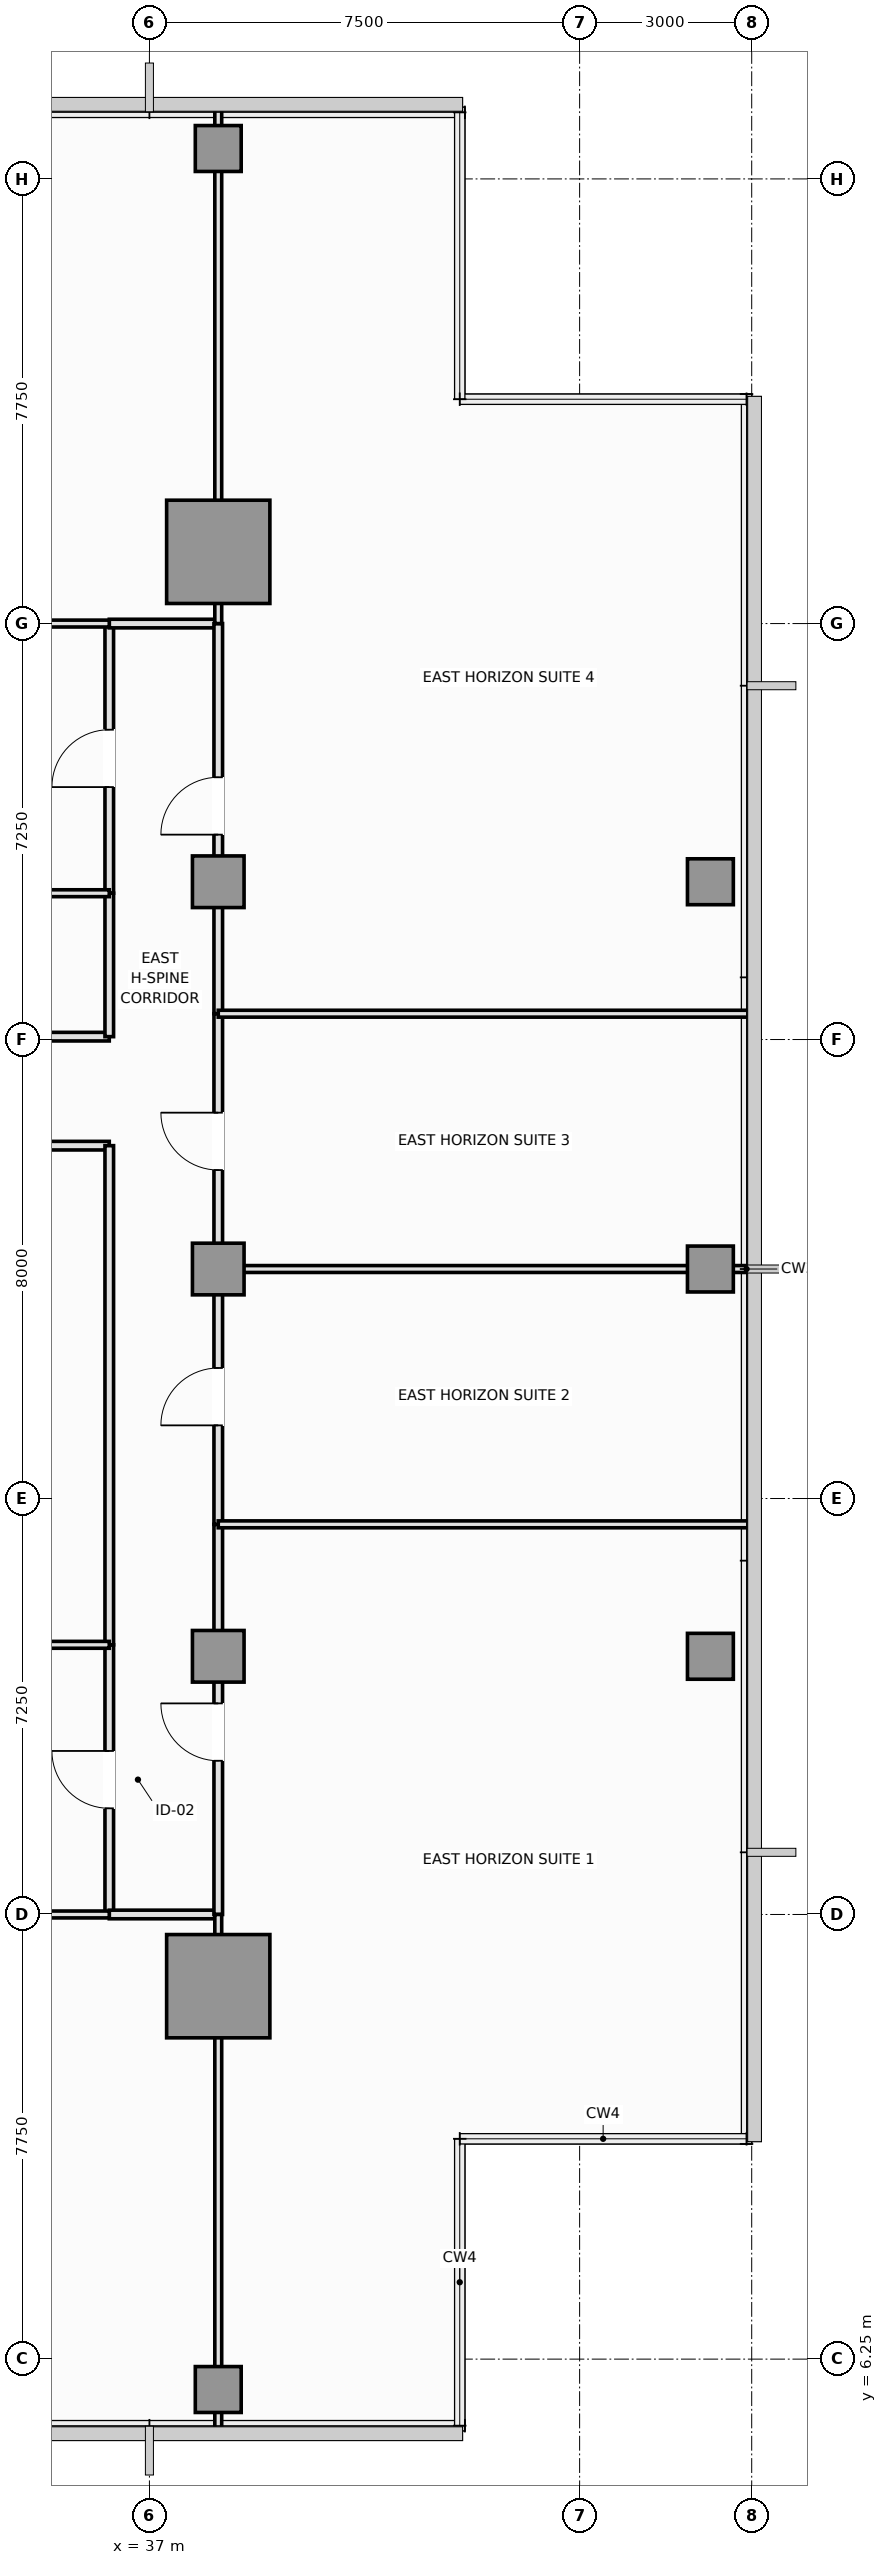
"""IFC4 building model, lengths in metres.
Left out: names, types, materials, properties, quantities, classifications, styles, units other than length and angle.
Written with IfcOpenShell. Run it as: python <this file> out.ifc"""

import sys

from ifc_helpers import new_model, si_unit, direction, frame, frame_2d, origin, origin_2d, place, context, subcontext, project, spatial, rectangle, extrude, element, fill, save


model = new_model("IFC4")
c1 = context("Model", 3, precision=1e-05, world=origin(), true_north=direction((0.0, 1.0)))
c2 = subcontext(c1, "Body", "Model", "MODEL_VIEW")
j1 = project(units=[si_unit("LENGTHUNIT", "METRE"), si_unit("PLANEANGLEUNIT", "RADIAN")], contexts=[c1])
p1 = place(None, origin())
s1 = spatial("IfcSite", under=j1, at=p1, CompositionType="ELEMENT")
p2 = place(p1, origin())
s2 = spatial("IfcBuilding", under=s1, at=p2, CompositionType="ELEMENT")
p3 = place(p2, frame((0.0, 0.0, 209.35)))
s3 = spatial("IfcBuildingStorey", under=s2, at=p3, CompositionType="ELEMENT", Elevation=209.35)
for number, where, z_axis, x_axis in (
    (1, (38.2, 12.75, 0.0), (0.0, 0.0, 1.0), (1.0, 0.0, 0.0)),
    (2, (38.2, 37.75, 0.0), (0.0, 0.0, 1.0), (1.0, 0.0, 0.0)),
):
    element("IfcColumn", number, at=place(p3, frame(where, z_axis=z_axis, x_axis=x_axis)), inside=s3, PredefinedType="COLUMN", context=c2, shape_type="SweptSolid", body=[
        extrude(rectangle(XDim=1.8, YDim=1.8, at=origin_2d()), origin(), (0.0, 0.0, 1.0), 3.55),
    ])
for number, where, z_axis, x_axis in (
    (3, (38.2, 18.5, 0.0), (0.0, 0.0, 1.0), (1.0, 0.0, 0.0)),
    (4, (38.2, 25.25, 0.0), (0.0, 0.0, 1.0), (1.0, 0.0, 0.0)),
    (5, (38.2, 32.0, 0.0), (0.0, 0.0, 1.0), (1.0, 0.0, 0.0)),
):
    element("IfcColumn", number, at=place(p3, frame(where, z_axis=z_axis, x_axis=x_axis)), inside=s3, PredefinedType="COLUMN", context=c2, shape_type="SweptSolid", body=[
        extrude(rectangle(XDim=0.9, YDim=0.9, at=origin_2d()), origin(), (0.0, 0.0, 1.0), 3.55),
    ])
for number, where, z_axis, x_axis in (
    (6, (46.78, 18.5, 0.0), (0.0, 0.0, 1.0), (1.0, 0.0, 0.0)),
    (7, (46.78, 25.25, 0.0), (0.0, 0.0, 1.0), (1.0, 0.0, 0.0)),
    (8, (46.78, 32.0, 0.0), (0.0, 0.0, 1.0), (1.0, 0.0, 0.0)),
    (9, (38.2, 5.72, 0.0), (0.0, 0.0, 1.0), (1.0, 0.0, 0.0)),
    (10, (38.2, 44.78, 0.0), (0.0, 0.0, 1.0), (1.0, 0.0, 0.0)),
):
    element("IfcColumn", number, at=place(p3, frame(where, z_axis=z_axis, x_axis=x_axis)), inside=s3, PredefinedType="COLUMN", context=c2, shape_type="SweptSolid", body=[
        extrude(rectangle(XDim=0.8, YDim=0.8, at=origin_2d()), origin(), (0.0, 0.0, 1.0), 3.55),
    ])
p4 = place(p3, frame((19.9, 27.4, 0.0), z_axis=(0.0, 0.0, 1.0), x_axis=(1.0, 0.0, 0.0)))
e11 = element("IfcWall", 11, at=p4, inside=s3, PredefinedType="PARTITIONING", context=c2, shape_type="SweptSolid", body=[
    extrude(rectangle(XDim=16.4, YDim=0.15, at=frame_2d((8.2, 0.0))), origin(), (0.0, 0.0, 1.0), 3.37),
])
p5 = place(p4, frame((7.7, 0.0, 0.0)))
e12 = element("IfcOpeningElement", 12, at=p5, cuts=e11, PredefinedType="OPENING", context=c2, shape_type="SweptSolid", body=[
    extrude(rectangle(XDim=1.0, YDim=2.15, at=frame_2d((0.5, 1.075))), frame((0.0, 0.085, 0.0), z_axis=(0.0, -1.0, 0.0), x_axis=(1.0, 0.0, 0.0)), (0.0, 0.0, 1.0), 0.17),
])
p6 = place(p3, frame((19.9, 29.3, 0.0), z_axis=(0.0, 0.0, 1.0), x_axis=(1.0, 0.0, 0.0)))
e13 = element("IfcWall", 13, at=p6, inside=s3, PredefinedType="PARTITIONING", context=c2, shape_type="SweptSolid", body=[
    extrude(rectangle(XDim=16.4, YDim=0.15, at=frame_2d((8.2, 0.0))), origin(), (0.0, 0.0, 1.0), 3.37),
])
p7 = place(p6, frame((7.7, 0.0, 0.0)))
e14 = element("IfcOpeningElement", 14, at=p7, cuts=e13, PredefinedType="OPENING", context=c2, shape_type="SweptSolid", body=[
    extrude(rectangle(XDim=1.0, YDim=2.15, at=frame_2d((0.5, 1.075))), frame((0.0, 0.085, 0.0), z_axis=(0.0, -1.0, 0.0), x_axis=(1.0, 0.0, 0.0)), (0.0, 0.0, 1.0), 0.17),
])
p8 = place(p3, frame((36.3, 14.0, 0.0), z_axis=(0.0, 0.0, 1.0), x_axis=(0.0, 1.0, 0.0)))
e15 = element("IfcWall", 15, at=p8, inside=s3, PredefinedType="PARTITIONING", context=c2, shape_type="SweptSolid", body=[
    extrude(rectangle(XDim=4.7, YDim=0.15, at=frame_2d((2.35, 0.0))), origin(), (0.0, 0.0, 1.0), 3.37),
])
p9 = place(p8, frame((1.85, 0.0, 0.0)))
e16 = element("IfcOpeningElement", 16, at=p9, cuts=e15, PredefinedType="OPENING", context=c2, shape_type="SweptSolid", body=[
    extrude(rectangle(XDim=1.0, YDim=2.15, at=frame_2d((0.5, 1.075))), frame((0.0, 0.085, 0.0), z_axis=(0.0, -1.0, 0.0), x_axis=(1.0, 0.0, 0.0)), (0.0, 0.0, 1.0), 0.17),
])
p10 = place(p3, frame((36.3, 31.8, 0.0), z_axis=(0.0, 0.0, 1.0), x_axis=(0.0, 1.0, 0.0)))
e17 = element("IfcWall", 17, at=p10, inside=s3, PredefinedType="PARTITIONING", context=c2, shape_type="SweptSolid", body=[
    extrude(rectangle(XDim=4.7, YDim=0.15, at=frame_2d((2.35, 0.0))), origin(), (0.0, 0.0, 1.0), 3.37),
])
p11 = place(p10, frame((1.85, 0.0, 0.0)))
e18 = element("IfcOpeningElement", 18, at=p11, cuts=e17, PredefinedType="OPENING", context=c2, shape_type="SweptSolid", body=[
    extrude(rectangle(XDim=1.0, YDim=2.15, at=frame_2d((0.5, 1.075))), frame((0.0, 0.085, 0.0), z_axis=(0.0, -1.0, 0.0), x_axis=(1.0, 0.0, 0.0)), (0.0, 0.0, 1.0), 0.17),
])
p12 = place(p3, frame((36.3, 18.7, 0.0), z_axis=(0.0, 0.0, 1.0), x_axis=(0.0, 1.0, 0.0)))
e19 = element("IfcWall", 19, at=p12, inside=s3, PredefinedType="PARTITIONING", context=c2, shape_type="SweptSolid", body=[
    extrude(rectangle(XDim=8.7, YDim=0.15, at=frame_2d((4.35, 0.0))), origin(), (0.0, 0.0, 1.0), 3.37),
])
p13 = place(p3, frame((36.3, 29.3, 0.0), z_axis=(0.0, 0.0, 1.0), x_axis=(0.0, 1.0, 0.0)))
e20 = element("IfcWall", 20, at=p13, inside=s3, PredefinedType="PARTITIONING", context=c2, shape_type="SweptSolid", body=[
    extrude(rectangle(XDim=2.5, YDim=0.15, at=frame_2d((1.25, 0.0))), origin(), (0.0, 0.0, 1.0), 3.37),
])
for number, where, z_axis, x_axis in (
    (21, (36.3, 14.0, 0.0), (0.0, 0.0, 1.0), (1.0, 0.0, 0.0)),
    (22, (36.3, 36.5, 0.0), (0.0, 0.0, 1.0), (1.0, 0.0, 0.0)),
):
    element("IfcWall", number, at=place(p3, frame(where, z_axis=z_axis, x_axis=x_axis)), inside=s3, PredefinedType="PARTITIONING", context=c2, shape_type="SweptSolid", body=[
        extrude(rectangle(XDim=1.9, YDim=0.15, at=frame_2d((0.95, 0.0))), origin(), (0.0, 0.0, 1.0), 3.37),
    ])
p14 = place(p3, frame((38.2, 14.0, 0.0), z_axis=(0.0, 0.0, 1.0), x_axis=(0.0, 1.0, 0.0)))
e23 = element("IfcWall", 23, at=p14, inside=s3, PredefinedType="PARTITIONING", context=c2, shape_type="SweptSolid", body=[
    extrude(rectangle(XDim=6.8, YDim=0.15, at=frame_2d((3.4, 0.0))), origin(), (0.0, 0.0, 1.0), 2.92),
])
p15 = place(p14, frame((2.679, 0.0, 0.0)))
e24 = element("IfcOpeningElement", 24, at=p15, cuts=e23, PredefinedType="OPENING", context=c2, shape_type="SweptSolid", body=[
    extrude(rectangle(XDim=1.0, YDim=2.15, at=frame_2d((0.5, 1.075))), frame((0.0, 0.085, 0.0), z_axis=(0.0, -1.0, 0.0), x_axis=(1.0, 0.0, 0.0)), (0.0, 0.0, 1.0), 0.17),
])
p16 = place(p3, frame((38.2, 20.8, 0.0), z_axis=(0.0, 0.0, 1.0), x_axis=(0.0, 1.0, 0.0)))
e25 = element("IfcWall", 25, at=p16, inside=s3, PredefinedType="PARTITIONING", context=c2, shape_type="SweptSolid", body=[
    extrude(rectangle(XDim=4.45, YDim=0.15, at=frame_2d((2.225, 0.0))), origin(), (0.0, 0.0, 1.0), 2.92),
])
p17 = place(p16, frame((1.725, 0.0, 0.0)))
e26 = element("IfcOpeningElement", 26, at=p17, cuts=e25, PredefinedType="OPENING", context=c2, shape_type="SweptSolid", body=[
    extrude(rectangle(XDim=1.0, YDim=2.15, at=frame_2d((0.5, 1.075))), frame((0.0, 0.085, 0.0), z_axis=(0.0, -1.0, 0.0), x_axis=(1.0, 0.0, 0.0)), (0.0, 0.0, 1.0), 0.17),
])
p18 = place(p3, frame((38.2, 25.25, 0.0), z_axis=(0.0, 0.0, 1.0), x_axis=(0.0, 1.0, 0.0)))
e27 = element("IfcWall", 27, at=p18, inside=s3, PredefinedType="PARTITIONING", context=c2, shape_type="SweptSolid", body=[
    extrude(rectangle(XDim=4.45, YDim=0.15, at=frame_2d((2.225, 0.0))), origin(), (0.0, 0.0, 1.0), 2.92),
])
p19 = place(p18, frame((1.725, 0.0, 0.0)))
e28 = element("IfcOpeningElement", 28, at=p19, cuts=e27, PredefinedType="OPENING", context=c2, shape_type="SweptSolid", body=[
    extrude(rectangle(XDim=1.0, YDim=2.15, at=frame_2d((0.5, 1.075))), frame((0.0, 0.085, 0.0), z_axis=(0.0, -1.0, 0.0), x_axis=(1.0, 0.0, 0.0)), (0.0, 0.0, 1.0), 0.17),
])
p20 = place(p3, frame((38.2, 29.7, 0.0), z_axis=(0.0, 0.0, 1.0), x_axis=(0.0, 1.0, 0.0)))
e29 = element("IfcWall", 29, at=p20, inside=s3, PredefinedType="PARTITIONING", context=c2, shape_type="SweptSolid", body=[
    extrude(rectangle(XDim=6.8, YDim=0.15, at=frame_2d((3.4, 0.0))), origin(), (0.0, 0.0, 1.0), 2.92),
])
p21 = place(p20, frame((3.121, 0.0, 0.0)))
e30 = element("IfcOpeningElement", 30, at=p21, cuts=e29, PredefinedType="OPENING", context=c2, shape_type="SweptSolid", body=[
    extrude(rectangle(XDim=1.0, YDim=2.15, at=frame_2d((0.5, 1.075))), frame((0.0, 0.085, 0.0), z_axis=(0.0, -1.0, 0.0), x_axis=(1.0, 0.0, 0.0)), (0.0, 0.0, 1.0), 0.17),
])
for number, where, z_axis, x_axis in (
    (31, (23.5, 18.7, 0.0), (0.0, 0.0, 1.0), (1.0, 0.0, 0.0)),
    (32, (23.5, 14.0, 0.0), (0.0, 0.0, 1.0), (1.0, 0.0, 0.0)),
    (33, (23.5, 31.8, 0.0), (0.0, 0.0, 1.0), (1.0, 0.0, 0.0)),
    (34, (23.5, 36.5, 0.0), (0.0, 0.0, 1.0), (1.0, 0.0, 0.0)),
):
    element("IfcWall", number, at=place(p3, frame(where, z_axis=z_axis, x_axis=x_axis)), inside=s3, PredefinedType="PARTITIONING", context=c2, shape_type="SweptSolid", body=[
        extrude(rectangle(XDim=12.8, YDim=0.12, at=frame_2d((6.4, 0.0))), origin(), (0.0, 0.0, 1.0), 3.37),
    ])
for number, where, z_axis, x_axis in (
    (35, (38.2, 5.01, 0.0), (0.0, 0.0, 1.0), (0.0, 1.0, 0.0)),
    (36, (38.2, 36.5, 0.0), (0.0, 0.0, 1.0), (0.0, 1.0, 0.0)),
):
    element("IfcWall", number, at=place(p3, frame(where, z_axis=z_axis, x_axis=x_axis)), inside=s3, PredefinedType="PARTITIONING", context=c2, shape_type="SweptSolid", body=[
        extrude(rectangle(XDim=8.99, YDim=0.12, at=frame_2d((4.495, 0.0))), origin(), (0.0, 0.0, 1.0), 2.92),
    ])
p22 = place(p3, frame((38.2, 20.8, 0.0), z_axis=(0.0, 0.0, 1.0), x_axis=(1.0, 0.0, 0.0)))
e37 = element("IfcWall", 37, at=p22, inside=s3, PredefinedType="PARTITIONING", context=c2, shape_type="SweptSolid", body=[
    extrude(rectangle(XDim=9.29, YDim=0.12, at=frame_2d((4.645, 0.0))), origin(), (0.0, 0.0, 1.0), 3.37),
])
p23 = place(p3, frame((38.2, 25.25, 0.0), z_axis=(0.0, 0.0, 1.0), x_axis=(1.0, 0.0, 0.0)))
e38 = element("IfcWall", 38, at=p23, inside=s3, PredefinedType="PARTITIONING", context=c2, shape_type="SweptSolid", body=[
    extrude(rectangle(XDim=9.29, YDim=0.12, at=frame_2d((4.645, 0.0))), origin(), (0.0, 0.0, 1.0), 2.87),
])
p24 = place(p3, frame((38.2, 29.7, 0.0), z_axis=(0.0, 0.0, 1.0), x_axis=(1.0, 0.0, 0.0)))
e39 = element("IfcWall", 39, at=p24, inside=s3, PredefinedType="PARTITIONING", context=c2, shape_type="SweptSolid", body=[
    extrude(rectangle(XDim=9.29, YDim=0.12, at=frame_2d((4.645, 0.0))), origin(), (0.0, 0.0, 1.0), 3.37),
])
p25 = place(p9, origin())
e40 = element("IfcDoor", 40, at=p25, inside=s3, OperationType="SINGLE_SWING_RIGHT", PredefinedType="DOOR", context=c2, shape_type="SweptSolid", body=[
    extrude(rectangle(XDim=1.0, YDim=2.15, at=frame_2d((0.5, 1.075))), frame((0.0, 0.025, 0.0), z_axis=(0.0, -1.0, 0.0), x_axis=(1.0, 0.0, 0.0)), (0.0, 0.0, 1.0), 0.05),
])
fill(e16, e40)
p26 = place(p11, origin())
e41 = element("IfcDoor", 41, at=p26, inside=s3, OperationType="SINGLE_SWING_LEFT", PredefinedType="DOOR", context=c2, shape_type="SweptSolid", body=[
    extrude(rectangle(XDim=1.0, YDim=2.15, at=frame_2d((0.5, 1.075))), frame((0.0, 0.025, 0.0), z_axis=(0.0, -1.0, 0.0), x_axis=(1.0, 0.0, 0.0)), (0.0, 0.0, 1.0), 0.05),
])
fill(e18, e41)
p27 = place(p15, origin())
e42 = element("IfcDoor", 42, at=p27, inside=s3, OperationType="SINGLE_SWING_RIGHT", PredefinedType="DOOR", context=c2, shape_type="SweptSolid", body=[
    extrude(rectangle(XDim=1.0, YDim=2.15, at=frame_2d((0.5, 1.075))), frame((0.0, 0.025, 0.0), z_axis=(0.0, -1.0, 0.0), x_axis=(1.0, 0.0, 0.0)), (0.0, 0.0, 1.0), 0.05),
])
fill(e24, e42)
p28 = place(p17, origin())
e43 = element("IfcDoor", 43, at=p28, inside=s3, OperationType="SINGLE_SWING_LEFT", PredefinedType="DOOR", context=c2, shape_type="SweptSolid", body=[
    extrude(rectangle(XDim=1.0, YDim=2.15, at=frame_2d((0.5, 1.075))), frame((0.0, 0.025, 0.0), z_axis=(0.0, -1.0, 0.0), x_axis=(1.0, 0.0, 0.0)), (0.0, 0.0, 1.0), 0.05),
])
fill(e26, e43)
p29 = place(p19, origin())
e44 = element("IfcDoor", 44, at=p29, inside=s3, OperationType="SINGLE_SWING_RIGHT", PredefinedType="DOOR", context=c2, shape_type="SweptSolid", body=[
    extrude(rectangle(XDim=1.0, YDim=2.15, at=frame_2d((0.5, 1.075))), frame((0.0, 0.025, 0.0), z_axis=(0.0, -1.0, 0.0), x_axis=(1.0, 0.0, 0.0)), (0.0, 0.0, 1.0), 0.05),
])
fill(e28, e44)
p30 = place(p21, origin())
e45 = element("IfcDoor", 45, at=p30, inside=s3, OperationType="SINGLE_SWING_LEFT", PredefinedType="DOOR", context=c2, shape_type="SweptSolid", body=[
    extrude(rectangle(XDim=1.0, YDim=2.15, at=frame_2d((0.5, 1.075))), frame((0.0, 0.025, 0.0), z_axis=(0.0, -1.0, 0.0), x_axis=(1.0, 0.0, 0.0)), (0.0, 0.0, 1.0), 0.05),
])
fill(e30, e45)
save(model, sys.argv[1])
